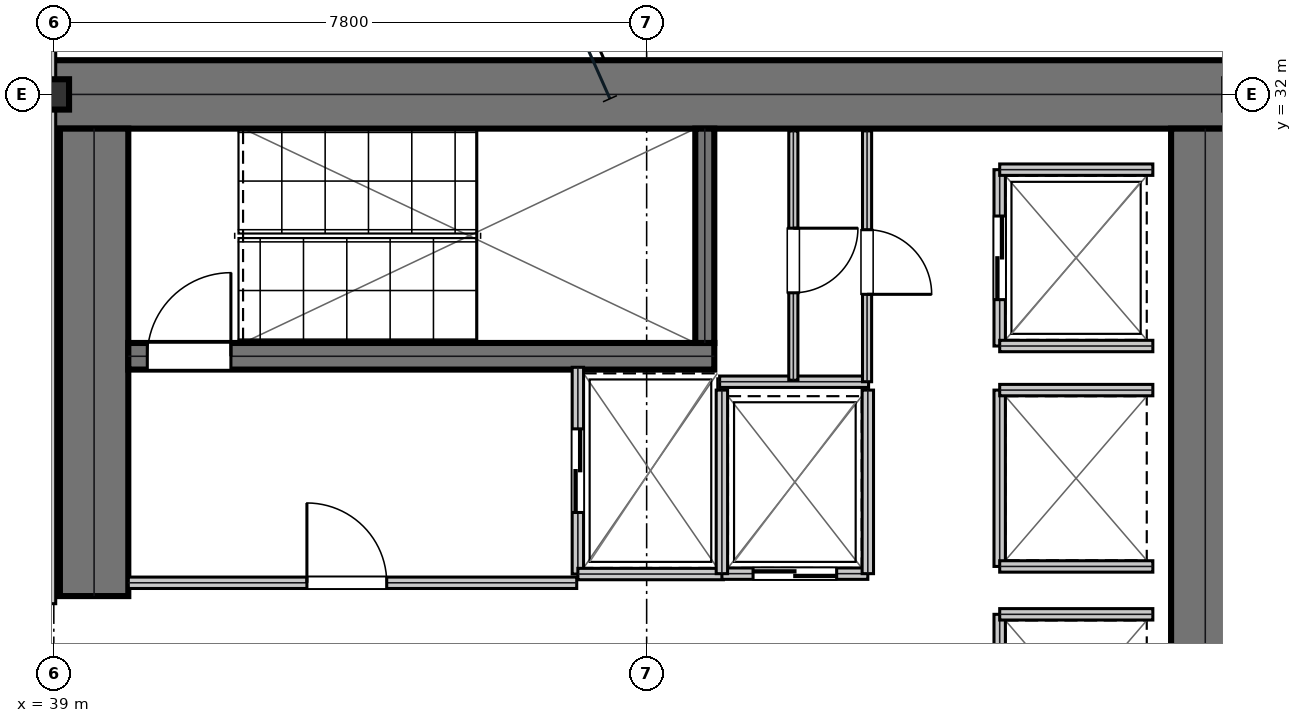
"""IFC4 building model, lengths in metres.
Left out: names, types, materials, properties, quantities, classifications, styles, units other than length and angle.
Written with IfcOpenShell. Run it as: python <this file> out.ifc"""

import sys

from ifc_helpers import new_model, si_unit, direction, frame, frame_2d, origin, origin_2d, place, context, subcontext, project, spatial, rectangle, i_section, extrude, element, fill, save


model = new_model("IFC4")
c1 = context("Model", 3, precision=1e-05, world=origin(), true_north=direction((0.0, 1.0)))
c2 = subcontext(c1, "Body", "Model", "MODEL_VIEW")
j1 = project(units=[si_unit("LENGTHUNIT", "METRE"), si_unit("PLANEANGLEUNIT", "RADIAN")], contexts=[c1])
p1 = place(None, origin())
s1 = spatial("IfcSite", under=j1, at=p1, CompositionType="ELEMENT")
p2 = place(p1, origin())
s2 = spatial("IfcBuilding", under=s1, at=p2, CompositionType="ELEMENT")
p3 = place(p2, frame((0.0, 0.0, 94.5)))
s3 = spatial("IfcBuildingStorey", under=s2, at=p3, CompositionType="ELEMENT", Elevation=94.5)
p4 = place(p3, frame((38.8, 32.0, 0.0), z_axis=(0.0, 0.0, 1.0), x_axis=(1.0, 0.0, 0.0)))
e1 = element("IfcWall", 1, at=p4, inside=s3, PredefinedType="SHEAR", context=c2, shape_type="SweptSolid", body=[
    extrude(rectangle(XDim=16.0, YDim=0.9, at=frame_2d((8.0, 0.0))), origin(), (0.0, 0.0, 1.0), 3.81),
])
p5 = place(p3, frame((39.53, 25.4, 0.0), z_axis=(0.0, 0.0, 1.0), x_axis=(0.0, 1.0, 0.0)))
e2 = element("IfcWall", 2, at=p5, inside=s3, PredefinedType="SHEAR", context=c2, shape_type="SweptSolid", body=[
    extrude(rectangle(XDim=6.15, YDim=0.9, at=frame_2d((3.075, 0.0))), origin(), (0.0, 0.0, 1.0), 3.81),
])
p6 = place(p3, frame((54.15, 16.45, 0.0), z_axis=(0.0, 0.0, 1.0), x_axis=(0.0, 1.0, 0.0)))
e3 = element("IfcWall", 3, at=p6, inside=s3, PredefinedType="SHEAR", context=c2, shape_type="SweptSolid", body=[
    extrude(rectangle(XDim=15.1, YDim=0.9, at=frame_2d((7.55, 0.0))), origin(), (0.0, 0.0, 1.0), 3.81),
])
p7 = place(p3, frame((39.98, 28.555, 0.0), z_axis=(0.0, 0.0, 1.0), x_axis=(1.0, 0.0, 0.0)))
e4 = element("IfcWall", 4, at=p7, inside=s3, PredefinedType="SHEAR", context=c2, shape_type="SweptSolid", body=[
    extrude(rectangle(XDim=7.71, YDim=0.35, at=frame_2d((3.855, 0.0))), origin(), (0.0, 0.0, 1.0), 3.81),
])
p8 = place(p7, frame((0.25, 0.0, 0.0)))
e5 = element("IfcOpeningElement", 5, at=p8, cuts=e4, PredefinedType="OPENING", context=c2, shape_type="SweptSolid", body=[
    extrude(rectangle(XDim=1.1, YDim=2.15, at=frame_2d((0.55, 1.075))), frame((0.0, 0.185, 0.0), z_axis=(0.0, -1.0, 0.0), x_axis=(1.0, 0.0, 0.0)), (0.0, 0.0, 1.0), 0.37),
])
p9 = place(p3, frame((47.565, 28.73, 0.0), z_axis=(0.0, 0.0, 1.0), x_axis=(0.0, 1.0, 0.0)))
e6 = element("IfcWall", 6, at=p9, inside=s3, PredefinedType="SHEAR", context=c2, shape_type="SweptSolid", body=[
    extrude(rectangle(XDim=2.82, YDim=0.25, at=frame_2d((1.41, 0.0))), origin(), (0.0, 0.0, 1.0), 3.81),
])
p10 = place(p3, frame((39.0, 32.0, 0.0), z_axis=(0.0, 0.0, 1.0), x_axis=(1.0, 0.0, 0.0)))
e7 = element("IfcColumn", 7, at=p10, inside=s3, PredefinedType="COLUMN", context=c2, shape_type="SweptSolid", body=[
    extrude(i_section(OverallWidth=0.401, OverallDepth=0.399, WebThickness=0.025, FlangeThickness=0.04, at=origin_2d()), origin(), (0.0, 0.0, 1.0), 4.044),
])
p11 = place(p3, frame((39.98, 25.575, 0.0), z_axis=(0.0, 0.0, 1.0), x_axis=(1.0, 0.0, 0.0)))
e8 = element("IfcWall", 8, at=p11, inside=s3, PredefinedType="PARTITIONING", context=c2, shape_type="SweptSolid", body=[
    extrude(rectangle(XDim=5.9, YDim=0.15, at=frame_2d((2.95, 0.0))), origin(), (0.0, 0.0, 1.0), 3.81),
])
p12 = place(p11, frame((2.35, 0.0, 0.0)))
e9 = element("IfcOpeningElement", 9, at=p12, cuts=e8, PredefinedType="OPENING", context=c2, shape_type="SweptSolid", body=[
    extrude(rectangle(XDim=1.05, YDim=2.15, at=frame_2d((0.525, 1.075))), frame((0.0, 0.085, 0.0), z_axis=(0.0, -1.0, 0.0), x_axis=(1.0, 0.0, 0.0)), (0.0, 0.0, 1.0), 0.17),
])
p13 = place(p3, frame((45.895, 25.69, 0.0), z_axis=(0.0, 0.0, 1.0), x_axis=(0.0, 1.0, 0.0)))
e10 = element("IfcWall", 10, at=p13, inside=s3, PredefinedType="PARTITIONING", context=c2, shape_type="SweptSolid", body=[
    extrude(rectangle(XDim=2.72, YDim=0.15, at=frame_2d((1.36, 0.0))), origin(), (0.0, 0.0, 1.0), 3.81),
])
p14 = place(p13, frame((0.81, 0.0, 0.0)))
e11 = element("IfcOpeningElement", 11, at=p14, cuts=e10, PredefinedType="OPENING", context=c2, shape_type="SweptSolid", body=[
    extrude(rectangle(XDim=1.1, YDim=2.15, at=frame_2d((0.55, 1.075))), frame((0.0, 0.085, 0.0), z_axis=(0.0, -1.0, 0.0), x_axis=(1.0, 0.0, 0.0)), (0.0, 0.0, 1.0), 0.17),
])
p15 = place(p3, frame((45.895, 25.69, 0.0), z_axis=(0.0, 0.0, 1.0), x_axis=(1.0, 0.0, 0.0)))
e12 = element("IfcWall", 12, at=p15, inside=s3, PredefinedType="PARTITIONING", context=c2, shape_type="SweptSolid", body=[
    extrude(rectangle(XDim=1.915, YDim=0.15, at=frame_2d((0.958, 0.0))), origin(), (0.0, 0.0, 1.0), 3.81),
])
p16 = place(p3, frame((47.79, 25.695, 0.0), z_axis=(0.0, 0.0, 1.0), x_axis=(1.0, 0.0, 0.0)))
e13 = element("IfcWall", 13, at=p16, inside=s3, PredefinedType="PARTITIONING", context=c2, shape_type="SweptSolid", body=[
    extrude(rectangle(XDim=1.92, YDim=0.15, at=frame_2d((0.96, 0.0))), origin(), (0.0, 0.0, 1.0), 3.81),
])
p17 = place(p16, frame((0.41, 0.0, 0.0)))
e14 = element("IfcOpeningElement", 14, at=p17, cuts=e13, PredefinedType="OPENING", context=c2, shape_type="SweptSolid", body=[
    extrude(rectangle(XDim=1.1, YDim=2.15, at=frame_2d((0.55, 1.075))), frame((0.0, 0.085, 0.0), z_axis=(0.0, -1.0, 0.0), x_axis=(1.0, 0.0, 0.0)), (0.0, 0.0, 1.0), 0.17),
])
for number, where, z_axis, x_axis in (
    (15, (47.79, 25.695, 0.0), (0.0, 0.0, 1.0), (0.0, 1.0, 0.0)),
    (16, (49.71, 25.695, 0.0), (0.0, 0.0, 1.0), (0.0, 1.0, 0.0)),
):
    element("IfcWall", number, at=place(p3, frame(where, z_axis=z_axis, x_axis=x_axis)), inside=s3, PredefinedType="PARTITIONING", context=c2, shape_type="SweptSolid", body=[
        extrude(rectangle(XDim=2.415, YDim=0.15, at=frame_2d((1.208, 0.0))), origin(), (0.0, 0.0, 1.0), 3.81),
    ])
p18 = place(p3, frame((51.445, 28.69, 0.0), z_axis=(0.0, 0.0, 1.0), x_axis=(0.0, 1.0, 0.0)))
e17 = element("IfcWall", 17, at=p18, inside=s3, PredefinedType="PARTITIONING", context=c2, shape_type="SweptSolid", body=[
    extrude(rectangle(XDim=2.32, YDim=0.15, at=frame_2d((1.16, 0.0))), origin(), (0.0, 0.0, 1.0), 3.81),
])
p19 = place(p18, frame((0.61, 0.0, 0.0)))
e18 = element("IfcOpeningElement", 18, at=p19, cuts=e17, PredefinedType="OPENING", context=c2, shape_type="SweptSolid", body=[
    extrude(rectangle(XDim=1.1, YDim=2.15, at=frame_2d((0.55, 1.075))), frame((0.0, 0.085, 0.0), z_axis=(0.0, -1.0, 0.0), x_axis=(1.0, 0.0, 0.0)), (0.0, 0.0, 1.0), 0.17),
])
for number, where, z_axis, x_axis in (
    (19, (51.445, 28.69, 0.0), (0.0, 0.0, 1.0), (1.0, 0.0, 0.0)),
    (20, (51.445, 31.01, 0.0), (0.0, 0.0, 1.0), (1.0, 0.0, 0.0)),
):
    element("IfcWall", number, at=place(p3, frame(where, z_axis=z_axis, x_axis=x_axis)), inside=s3, PredefinedType="PARTITIONING", context=c2, shape_type="SweptSolid", body=[
        extrude(rectangle(XDim=2.015, YDim=0.15, at=frame_2d((1.007, 0.0))), origin(), (0.0, 0.0, 1.0), 3.81),
    ])
p20 = place(p3, frame((51.445, 25.79, 0.0), z_axis=(0.0, 0.0, 1.0), x_axis=(0.0, 1.0, 0.0)))
e21 = element("IfcWall", 21, at=p20, inside=s3, PredefinedType="PARTITIONING", context=c2, shape_type="SweptSolid", body=[
    extrude(rectangle(XDim=2.32, YDim=0.15, at=frame_2d((1.16, 0.0))), origin(), (0.0, 0.0, 1.0), 3.81),
])
for number, where, z_axis, x_axis in (
    (22, (51.445, 25.79, 0.0), (0.0, 0.0, 1.0), (1.0, 0.0, 0.0)),
    (23, (51.445, 28.11, 0.0), (0.0, 0.0, 1.0), (1.0, 0.0, 0.0)),
):
    element("IfcWall", number, at=place(p3, frame(where, z_axis=z_axis, x_axis=x_axis)), inside=s3, PredefinedType="PARTITIONING", context=c2, shape_type="SweptSolid", body=[
        extrude(rectangle(XDim=2.015, YDim=0.15, at=frame_2d((1.007, 0.0))), origin(), (0.0, 0.0, 1.0), 3.81),
    ])
p21 = place(p3, frame((51.445, 22.84, 0.0), z_axis=(0.0, 0.0, 1.0), x_axis=(0.0, 1.0, 0.0)))
e24 = element("IfcWall", 24, at=p21, inside=s3, PredefinedType="PARTITIONING", context=c2, shape_type="SweptSolid", body=[
    extrude(rectangle(XDim=2.32, YDim=0.15, at=frame_2d((1.16, 0.0))), origin(), (0.0, 0.0, 1.0), 3.81),
])
p22 = place(p3, frame((51.445, 25.16, 0.0), z_axis=(0.0, 0.0, 1.0), x_axis=(1.0, 0.0, 0.0)))
e25 = element("IfcWall", 25, at=p22, inside=s3, PredefinedType="PARTITIONING", context=c2, shape_type="SweptSolid", body=[
    extrude(rectangle(XDim=2.015, YDim=0.15, at=frame_2d((1.007, 0.0))), origin(), (0.0, 0.0, 1.0), 3.81),
])
p23 = place(p3, frame((47.76, 28.22, 0.0), z_axis=(0.0, 0.0, 1.0), x_axis=(1.0, 0.0, 0.0)))
e26 = element("IfcWall", 26, at=p23, inside=s3, PredefinedType="PARTITIONING", context=c2, shape_type="SweptSolid", body=[
    extrude(rectangle(XDim=1.96, YDim=0.15, at=frame_2d((0.98, 0.0))), origin(), (0.0, 0.0, 1.0), 3.81),
])
p24 = place(p3, frame((48.73, 28.24, 0.0), z_axis=(0.0, 0.0, 1.0), x_axis=(0.0, 1.0, 0.0)))
e27 = element("IfcWall", 27, at=p24, inside=s3, PredefinedType="PARTITIONING", context=c2, shape_type="SweptSolid", body=[
    extrude(rectangle(XDim=3.28, YDim=0.12, at=frame_2d((1.64, 0.0))), origin(), (0.0, 0.0, 1.0), 3.81),
])
p25 = place(p24, frame((1.15, 0.0, 0.0)))
e28 = element("IfcOpeningElement", 28, at=p25, cuts=e27, PredefinedType="OPENING", context=c2, shape_type="SweptSolid", body=[
    extrude(rectangle(XDim=0.85, YDim=2.15, at=frame_2d((0.425, 1.075))), frame((0.0, 0.07, 0.0), z_axis=(0.0, -1.0, 0.0), x_axis=(1.0, 0.0, 0.0)), (0.0, 0.0, 1.0), 0.14),
])
p26 = place(p3, frame((49.7, 28.22, 0.0), z_axis=(0.0, 0.0, 1.0), x_axis=(0.0, 1.0, 0.0)))
e29 = element("IfcWall", 29, at=p26, inside=s3, PredefinedType="PARTITIONING", context=c2, shape_type="SweptSolid", body=[
    extrude(rectangle(XDim=3.3, YDim=0.12, at=frame_2d((1.65, 0.0))), origin(), (0.0, 0.0, 1.0), 3.81),
])
p27 = place(p26, frame((1.15, 0.0, 0.0)))
e30 = element("IfcOpeningElement", 30, at=p27, cuts=e29, PredefinedType="OPENING", context=c2, shape_type="SweptSolid", body=[
    extrude(rectangle(XDim=0.85, YDim=2.15, at=frame_2d((0.425, 1.075))), frame((0.0, 0.07, 0.0), z_axis=(0.0, -1.0, 0.0), x_axis=(1.0, 0.0, 0.0)), (0.0, 0.0, 1.0), 0.14),
])
p28 = place(p3, frame((38.95, 25.3, 0.0), z_axis=(0.0, 0.0, 1.0), x_axis=(0.0, 1.0, 0.0)))
e31 = element("IfcWall", 31, at=p28, inside=s3, PredefinedType="PARTITIONING", context=c2, shape_type="SweptSolid", body=[
    extrude(rectangle(XDim=8.2, YDim=0.15, at=frame_2d((4.1, 0.0))), origin(), (0.0, 0.0, 1.0), 3.181),
])
p29 = place(p12, origin())
e32 = element("IfcDoor", 32, at=p29, inside=s3, OperationType="SINGLE_SWING_LEFT", PredefinedType="DOOR", context=c2, shape_type="SweptSolid", body=[
    extrude(rectangle(XDim=1.05, YDim=2.15, at=frame_2d((0.525, 1.075))), frame((0.0, 0.025, 0.0), z_axis=(0.0, -1.0, 0.0), x_axis=(1.0, 0.0, 0.0)), (0.0, 0.0, 1.0), 0.05),
])
fill(e9, e32)
p30 = place(p14, frame((1.1, 0.0, 0.0), z_axis=(0.0, 0.0, 1.0), x_axis=(-1.0, 0.0, 0.0)))
e33 = element("IfcDoor", 33, at=p30, inside=s3, OperationType="DOUBLE_DOOR_SLIDING", PredefinedType="DOOR", context=c2, shape_type="SweptSolid", body=[
    extrude(rectangle(XDim=1.1, YDim=2.15, at=frame_2d((0.55, 1.075))), frame((0.0, 0.025, 0.0), z_axis=(0.0, -1.0, 0.0), x_axis=(1.0, 0.0, 0.0)), (0.0, 0.0, 1.0), 0.05),
])
fill(e11, e33)
p31 = place(p17, frame((1.1, 0.0, 0.0), z_axis=(0.0, 0.0, 1.0), x_axis=(-1.0, 0.0, 0.0)))
e34 = element("IfcDoor", 34, at=p31, inside=s3, OperationType="DOUBLE_DOOR_SLIDING", PredefinedType="DOOR", context=c2, shape_type="SweptSolid", body=[
    extrude(rectangle(XDim=1.1, YDim=2.15, at=frame_2d((0.55, 1.075))), frame((0.0, 0.025, 0.0), z_axis=(0.0, -1.0, 0.0), x_axis=(1.0, 0.0, 0.0)), (0.0, 0.0, 1.0), 0.05),
])
fill(e14, e34)
p32 = place(p19, frame((1.1, 0.0, 0.0), z_axis=(0.0, 0.0, 1.0), x_axis=(-1.0, 0.0, 0.0)))
e35 = element("IfcDoor", 35, at=p32, inside=s3, OperationType="DOUBLE_DOOR_SLIDING", PredefinedType="DOOR", context=c2, shape_type="SweptSolid", body=[
    extrude(rectangle(XDim=1.1, YDim=2.15, at=frame_2d((0.55, 1.075))), frame((0.0, 0.025, 0.0), z_axis=(0.0, -1.0, 0.0), x_axis=(1.0, 0.0, 0.0)), (0.0, 0.0, 1.0), 0.05),
])
fill(e18, e35)
p33 = place(p25, frame((0.85, 0.0, 0.0), z_axis=(0.0, 0.0, 1.0), x_axis=(-1.0, 0.0, 0.0)))
e36 = element("IfcDoor", 36, at=p33, inside=s3, OperationType="SINGLE_SWING_LEFT", PredefinedType="DOOR", context=c2, shape_type="SweptSolid", body=[
    extrude(rectangle(XDim=0.85, YDim=2.15, at=frame_2d((0.425, 1.075))), frame((0.0, 0.025, 0.0), z_axis=(0.0, -1.0, 0.0), x_axis=(1.0, 0.0, 0.0)), (0.0, 0.0, 1.0), 0.05),
])
fill(e28, e36)
p34 = place(p27, frame((0.85, 0.0, 0.0), z_axis=(0.0, 0.0, 1.0), x_axis=(-1.0, 0.0, 0.0)))
e37 = element("IfcDoor", 37, at=p34, inside=s3, OperationType="SINGLE_SWING_RIGHT", PredefinedType="DOOR", context=c2, shape_type="SweptSolid", body=[
    extrude(rectangle(XDim=0.85, YDim=2.15, at=frame_2d((0.425, 1.075))), frame((0.0, 0.025, 0.0), z_axis=(0.0, -1.0, 0.0), x_axis=(1.0, 0.0, 0.0)), (0.0, 0.0, 1.0), 0.05),
])
fill(e30, e37)
p35 = place(p8, origin())
e38 = element("IfcDoor", 38, at=p35, inside=s3, OperationType="SINGLE_SWING_RIGHT", PredefinedType="DOOR", context=c2, shape_type="SweptSolid", body=[
    extrude(rectangle(XDim=1.1, YDim=2.15, at=frame_2d((0.55, 1.075))), frame((0.0, 0.025, 0.0), z_axis=(0.0, -1.0, 0.0), x_axis=(1.0, 0.0, 0.0)), (0.0, 0.0, 1.0), 0.05),
])
fill(e5, e38)
save(model, sys.argv[1])
